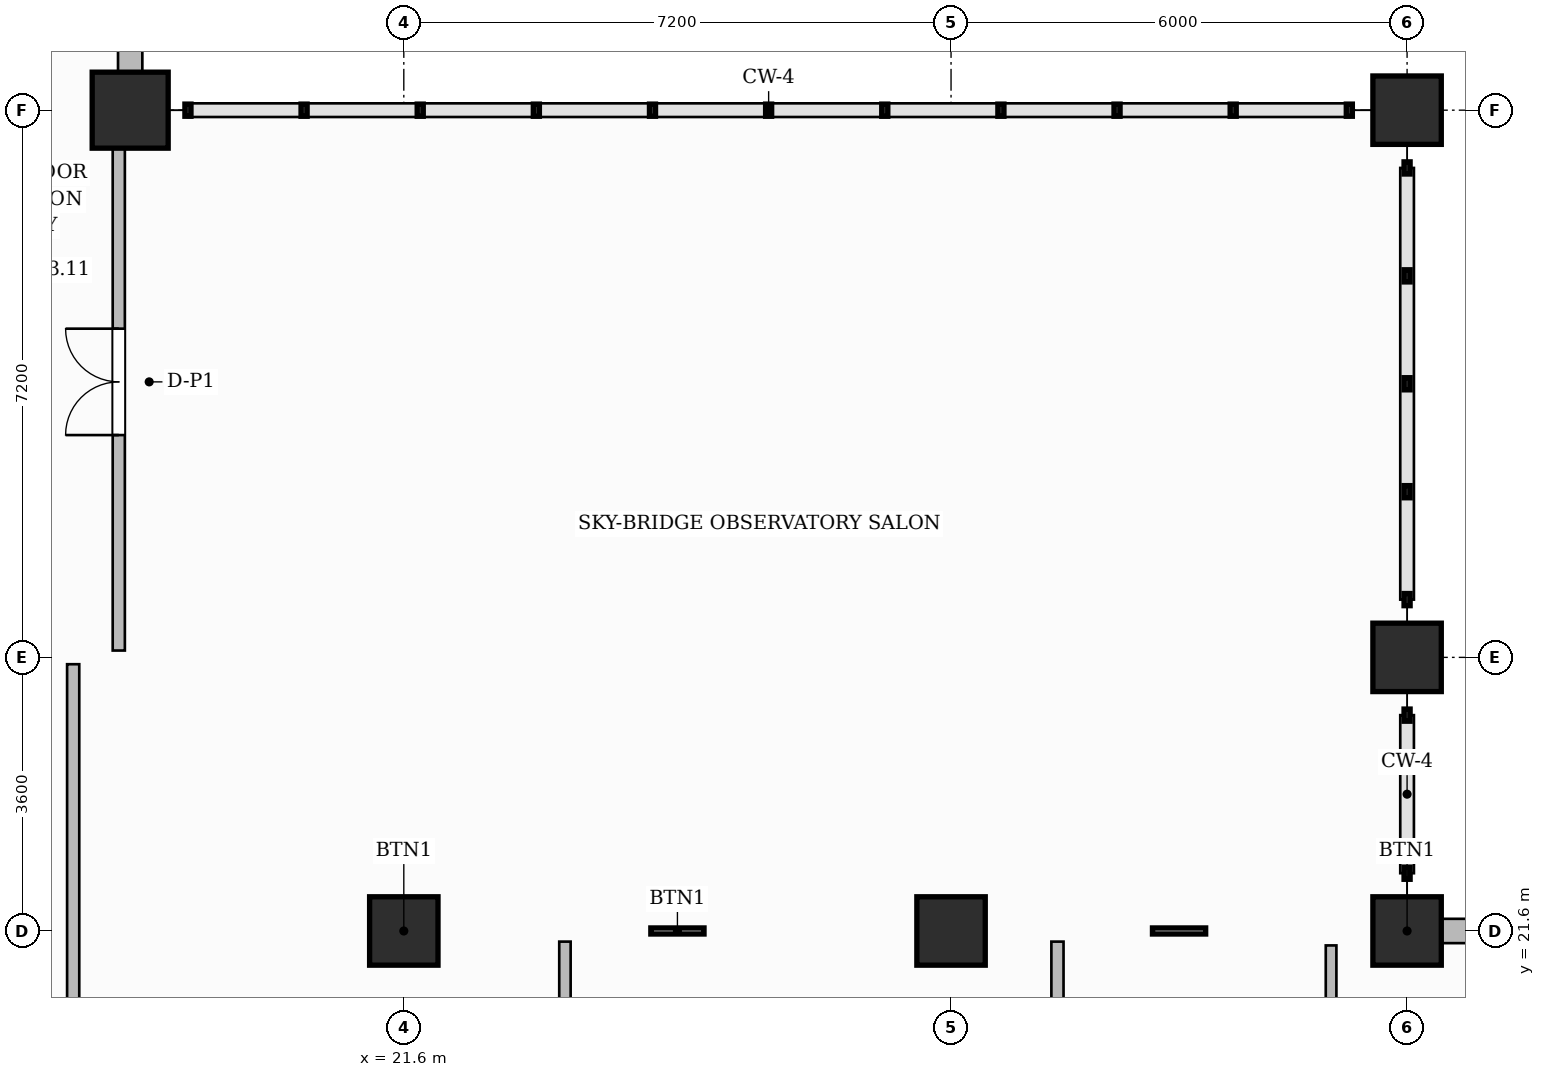
"""IFC4 building model, lengths in metres.
Left out: names, types, materials, properties, quantities, classifications, styles, units other than length and angle.
Written with IfcOpenShell. Run it as: python <this file> out.ifc"""

import sys

from ifc_helpers import new_model, si_unit, direction, frame, frame_2d, origin, origin_2d, place, context, subcontext, project, spatial, rectangle, extrude, source, transform, mapped, element, fill, save


model = new_model("IFC4")
c1 = context("Model", 3, precision=1e-05, world=origin(), true_north=direction((0.0, 1.0)))
c2 = subcontext(c1, "Body", "Model", "MODEL_VIEW")
j1 = project(units=[si_unit("LENGTHUNIT", "METRE"), si_unit("PLANEANGLEUNIT", "RADIAN")], contexts=[c1])
p1 = place(None, origin())
s1 = spatial("IfcSite", under=j1, at=p1, CompositionType="ELEMENT")
p2 = place(p1, origin())
s2 = spatial("IfcBuilding", under=s1, at=p2, CompositionType="ELEMENT")
p3 = place(p2, frame((0.0, 0.0, 201.9)))
s3 = spatial("IfcBuildingStorey", under=s2, at=p3, CompositionType="ELEMENT", Elevation=201.9)
m1 = source(origin(), c2, "Body", "SweptSolid", [
    extrude(rectangle(XDim=0.9, YDim=0.9, at=origin_2d()), origin(), (0.0, 0.0, 1.0), 3.85),
])
for number, where, z_axis, x_axis in (
    (1, (21.6, 21.6, 0.0), (0.0, 0.0, 1.0), (1.0, 0.0, 0.0)),
    (2, (28.8, 21.6, 0.0), (0.0, 0.0, 1.0), (1.0, 0.0, 0.0)),
    (3, (34.8, 21.6, 0.0), (0.0, 0.0, 1.0), (1.0, 0.0, 0.0)),
    (4, (34.8, 25.2, 0.0), (0.0, 0.0, 1.0), (1.0, 0.0, 0.0)),
    (5, (34.8, 32.4, 0.0), (0.0, 0.0, 1.0), (1.0, 0.0, 0.0)),
):
    element("IfcColumn", number, at=place(p3, frame(where, z_axis=z_axis, x_axis=x_axis)), inside=s3, PredefinedType="COLUMN", context=c2, shape_type="MappedRepresentation", body=[
        mapped(m1, transform((0.0, 0.0, 0.0), scale=1.0)),
    ])
m2 = source(origin(), c2, "Body", "SweptSolid", [
    extrude(rectangle(XDim=1.0, YDim=1.0, at=origin_2d()), origin(), (0.0, 0.0, 1.0), 3.85),
])
p4 = place(p3, frame((18.0, 32.4, 0.0), z_axis=(0.0, 0.0, 1.0), x_axis=(1.0, 0.0, 0.0)))
e6 = element("IfcColumn", 6, at=p4, inside=s3, PredefinedType="COLUMN", context=c2, shape_type="MappedRepresentation", body=[
    mapped(m2, transform((0.0, 0.0, 0.0), scale=1.0)),
])
p5 = place(p3, frame((30.2, 11.36, 0.0), z_axis=(0.0, 0.0, 1.0), x_axis=(0.0, 1.0, 0.0)))
e7 = element("IfcWall", 7, at=p5, inside=s3, PredefinedType="PARTITIONING", context=c2, shape_type="SweptSolid", body=[
    extrude(rectangle(XDim=10.1, YDim=0.16, at=frame_2d((5.05, 0.0))), origin(), (0.0, 0.0, 1.0), 3.6),
])
p6 = place(p3, frame((33.8, 17.09, 0.0), z_axis=(0.0, 0.0, 1.0), x_axis=(0.0, 1.0, 0.0)))
e8 = element("IfcWall", 8, at=p6, inside=s3, PredefinedType="PARTITIONING", context=c2, shape_type="SweptSolid", body=[
    extrude(rectangle(XDim=4.32, YDim=0.14, at=frame_2d((2.16, 0.0))), origin(), (0.0, 0.0, 1.0), 3.6),
])
p7 = place(p3, frame((17.25, 11.36, 0.0), z_axis=(0.0, 0.0, 1.0), x_axis=(0.0, 1.0, 0.0)))
e9 = element("IfcWall", 9, at=p7, inside=s3, PredefinedType="PARTITIONING", context=c2, shape_type="SweptSolid", body=[
    extrude(rectangle(XDim=13.75, YDim=0.16, at=frame_2d((6.875, 0.0))), origin(), (0.0, 0.0, 1.0), 3.6),
])
p8 = place(p3, frame((23.72, 11.36, 0.0), z_axis=(0.0, 0.0, 1.0), x_axis=(0.0, 1.0, 0.0)))
e10 = element("IfcWall", 10, at=p8, inside=s3, PredefinedType="PARTITIONING", context=c2, shape_type="SweptSolid", body=[
    extrude(rectangle(XDim=10.1, YDim=0.15, at=frame_2d((5.05, 0.0))), origin(), (0.0, 0.0, 1.0), 3.6),
])
p9 = place(p8, frame((0.535, 0.0, 0.0)))
e11 = element("IfcOpeningElement", 11, at=p9, cuts=e10, PredefinedType="OPENING", context=c2, shape_type="SweptSolid", body=[
    extrude(rectangle(XDim=0.9, YDim=2.15, at=frame_2d((0.45, 1.075))), frame((0.0, 0.085, 0.0), z_axis=(0.0, -1.0, 0.0), x_axis=(1.0, 0.0, 0.0)), (0.0, 0.0, 1.0), 0.17),
])
p10 = place(p3, frame((17.85, 25.29, 0.0), z_axis=(0.0, 0.0, 1.0), x_axis=(0.0, 1.0, 0.0)))
e12 = element("IfcWall", 12, at=p10, inside=s3, PredefinedType="PARTITIONING", context=c2, shape_type="SweptSolid", body=[
    extrude(rectangle(XDim=6.92, YDim=0.16, at=frame_2d((3.46, 0.0))), origin(), (0.0, 0.0, 1.0), 3.6),
])
p11 = place(p10, frame((2.835, 0.0, 0.0)))
e13 = element("IfcOpeningElement", 13, at=p11, cuts=e12, PredefinedType="OPENING", context=c2, shape_type="SweptSolid", body=[
    extrude(rectangle(XDim=1.4, YDim=2.35, at=frame_2d((0.7, 1.175))), frame((0.0, 0.09, 0.0), z_axis=(0.0, -1.0, 0.0), x_axis=(1.0, 0.0, 0.0)), (0.0, 0.0, 1.0), 0.18),
])
p12 = place(p3, frame((34.8, 21.6, 0.0), z_axis=(0.0, 0.0, 1.0), x_axis=(1.0, 0.0, 0.0)))
e14 = element("IfcWall", 14, at=p12, inside=s3, PredefinedType="SOLIDWALL", context=c2, shape_type="SweptSolid", body=[
    extrude(rectangle(XDim=15.0, YDim=0.32, at=frame_2d((7.5, 0.0))), origin(), (0.0, 0.0, 1.0), 3.085),
])
p13 = place(p12, frame((1.325, 0.0, 0.8)))
e15 = element("IfcOpeningElement", 15, at=p13, cuts=e14, PredefinedType="OPENING", context=c2, shape_type="SweptSolid", body=[
    extrude(rectangle(XDim=1.8, YDim=1.85, at=frame_2d((0.9, 0.925))), frame((0.0, 0.17, 0.0), z_axis=(0.0, -1.0, 0.0), x_axis=(1.0, 0.0, 0.0)), (0.0, 0.0, 1.0), 0.34),
])
p14 = place(p12, frame((4.075, 0.0, 0.8)))
e16 = element("IfcOpeningElement", 16, at=p14, cuts=e14, PredefinedType="OPENING", context=c2, shape_type="SweptSolid", body=[
    extrude(rectangle(XDim=1.8, YDim=1.85, at=frame_2d((0.9, 0.925))), frame((0.0, 0.17, 0.0), z_axis=(0.0, -1.0, 0.0), x_axis=(1.0, 0.0, 0.0)), (0.0, 0.0, 1.0), 0.34),
])
p15 = place(p12, frame((8.675, 0.0, 0.8)))
e17 = element("IfcOpeningElement", 17, at=p15, cuts=e14, PredefinedType="OPENING", context=c2, shape_type="SweptSolid", body=[
    extrude(rectangle(XDim=1.8, YDim=1.85, at=frame_2d((0.9, 0.925))), frame((0.0, 0.17, 0.0), z_axis=(0.0, -1.0, 0.0), x_axis=(1.0, 0.0, 0.0)), (0.0, 0.0, 1.0), 0.34),
])
p16 = place(p12, frame((11.725, 0.0, 0.8)))
e18 = element("IfcOpeningElement", 18, at=p16, cuts=e14, PredefinedType="OPENING", context=c2, shape_type="SweptSolid", body=[
    extrude(rectangle(XDim=1.8, YDim=1.85, at=frame_2d((0.9, 0.925))), frame((0.0, 0.17, 0.0), z_axis=(0.0, -1.0, 0.0), x_axis=(1.0, 0.0, 0.0)), (0.0, 0.0, 1.0), 0.34),
])
p17 = place(p3, frame((18.0, 32.4, 0.0), z_axis=(0.0, 0.0, 1.0), x_axis=(0.0, 1.0, 0.0)))
e19 = element("IfcWall", 19, at=p17, inside=s3, PredefinedType="SOLIDWALL", context=c2, shape_type="SweptSolid", body=[
    extrude(rectangle(XDim=14.35, YDim=0.32, at=frame_2d((7.175, 0.0))), origin(), (0.0, 0.0, 1.0), 3.6),
])
p18 = place(p17, frame((1.956, 0.0, 0.0)))
e20 = element("IfcOpeningElement", 20, at=p18, cuts=e19, PredefinedType="OPENING", context=c2, shape_type="SweptSolid", body=[
    extrude(rectangle(XDim=1.2, YDim=2.2, at=frame_2d((0.6, 1.1))), frame((0.0, 0.17, 0.0), z_axis=(0.0, -1.0, 0.0), x_axis=(1.0, 0.0, 0.0)), (0.0, 0.0, 1.0), 0.34),
])
p19 = place(p17, frame((4.028, 0.0, 0.8)))
e21 = element("IfcOpeningElement", 21, at=p19, cuts=e19, PredefinedType="OPENING", context=c2, shape_type="SweptSolid", body=[
    extrude(rectangle(XDim=1.8, YDim=1.85, at=frame_2d((0.9, 0.925))), frame((0.0, 0.17, 0.0), z_axis=(0.0, -1.0, 0.0), x_axis=(1.0, 0.0, 0.0)), (0.0, 0.0, 1.0), 0.34),
])
p20 = place(p17, frame((8.525, 0.0, 0.8)))
e22 = element("IfcOpeningElement", 22, at=p20, cuts=e19, PredefinedType="OPENING", context=c2, shape_type="SweptSolid", body=[
    extrude(rectangle(XDim=1.8, YDim=1.85, at=frame_2d((0.9, 0.925))), frame((0.0, 0.17, 0.0), z_axis=(0.0, -1.0, 0.0), x_axis=(1.0, 0.0, 0.0)), (0.0, 0.0, 1.0), 0.34),
])
p21 = place(p17, frame((11.275, 0.0, 0.8)))
e23 = element("IfcOpeningElement", 23, at=p21, cuts=e19, PredefinedType="OPENING", context=c2, shape_type="SweptSolid", body=[
    extrude(rectangle(XDim=1.8, YDim=1.85, at=frame_2d((0.9, 0.925))), frame((0.0, 0.17, 0.0), z_axis=(0.0, -1.0, 0.0), x_axis=(1.0, 0.0, 0.0)), (0.0, 0.0, 1.0), 0.34),
])
m3 = source(origin(), c2, "Body", "SweptSolid", [
    extrude(rectangle(XDim=1.4, YDim=2.35, at=frame_2d((0.7, 1.175))), frame((0.0, 0.025, 0.0), z_axis=(0.0, -1.0, 0.0), x_axis=(1.0, 0.0, 0.0)), (0.0, 0.0, 1.0), 0.05),
])
p22 = place(p11, origin())
e24 = element("IfcDoor", 24, at=p22, inside=s3, OperationType="DOUBLE_DOOR_SINGLE_SWING", PredefinedType="DOOR", context=c2, shape_type="MappedRepresentation", body=[
    mapped(m3, transform((0.0, 0.0, 0.0), scale=1.0)),
])
fill(e13, e24)
save(model, sys.argv[1])
